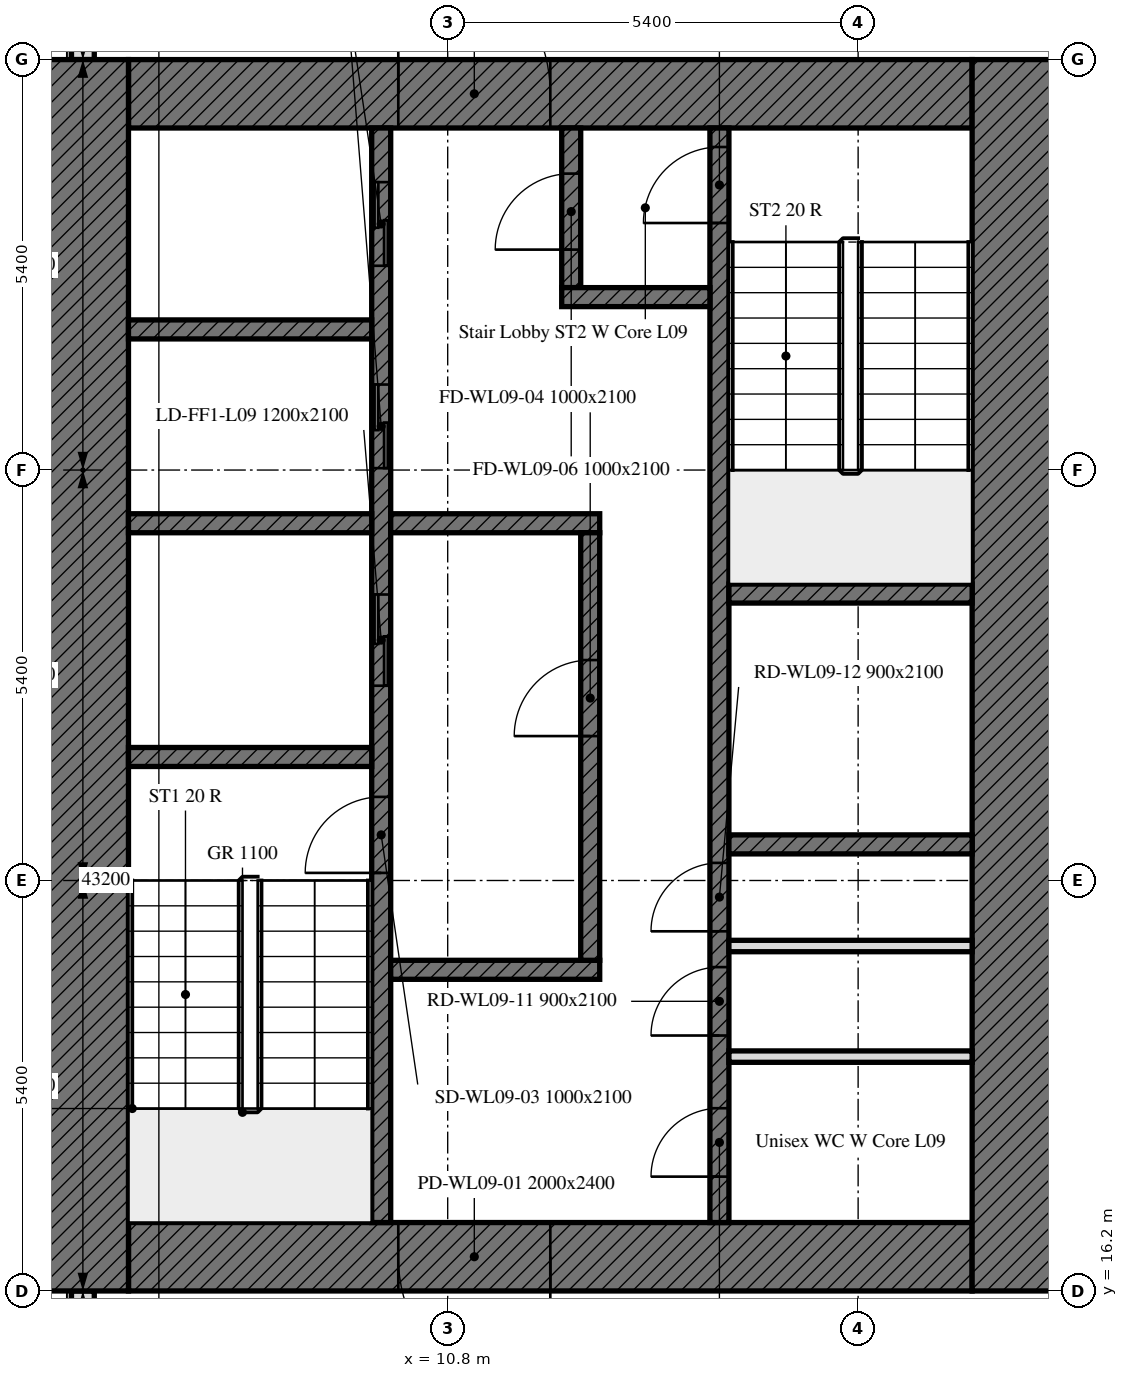
"""IFC4 building model, lengths in metres.
Left out: names, types, materials, properties, quantities, classifications, styles, units other than length and angle.
Written with IfcOpenShell. Run it as: python <this file> out.ifc"""

import sys

from ifc_helpers import new_model, si_unit, direction, frame, frame_2d, origin, place, context, subcontext, project, spatial, rectangle, extrude, element, fill, save


model = new_model("IFC4")
c1 = context("Model", 3, precision=1e-05, world=origin(), true_north=direction((0.0, 1.0)))
c2 = subcontext(c1, "Body", "Model", "MODEL_VIEW")
j1 = project(units=[si_unit("LENGTHUNIT", "METRE"), si_unit("PLANEANGLEUNIT", "RADIAN")], contexts=[c1])
p1 = place(None, origin())
s1 = spatial("IfcSite", under=j1, at=p1, CompositionType="ELEMENT")
p2 = place(p1, origin())
s2 = spatial("IfcBuilding", under=s1, at=p2, CompositionType="ELEMENT")
p3 = place(p2, frame((0.0, 0.0, 45.0)))
s3 = spatial("IfcBuildingStorey", under=s2, at=p3, CompositionType="ELEMENT", Elevation=45.0)
p4 = place(p3, frame((6.0, 37.614, 0.0), z_axis=(0.0, 0.0, 1.0), x_axis=(0.0, -1.0, 0.0)))
e1 = element("IfcWall", 1, at=p4, inside=s3, PredefinedType="SOLIDWALL", context=c2, shape_type="SweptSolid", body=[
    extrude(rectangle(XDim=5.214, YDim=0.3, at=frame_2d((2.607, 0.0))), origin(), (0.0, 0.0, 1.0), 3.5),
])
p5 = place(p3, frame((6.0, 16.2, 0.0), z_axis=(0.0, 0.0, 1.0), x_axis=(0.0, -1.0, 0.0)))
e2 = element("IfcWall", 2, at=p5, inside=s3, PredefinedType="SOLIDWALL", context=c2, shape_type="SweptSolid", body=[
    extrude(rectangle(XDim=10.614, YDim=0.3, at=frame_2d((5.307, 0.0))), origin(), (0.0, 0.0, 1.0), 3.5),
])
p6 = place(p5, frame((6.4, 0.0, 0.9)))
e3 = element("IfcOpeningElement", 3, at=p6, cuts=e2, PredefinedType="OPENING", context=c2, shape_type="SweptSolid", body=[
    extrude(rectangle(XDim=3.4, YDim=1.7, at=frame_2d((1.7, 0.85))), frame((0.0, 0.16, 0.0), z_axis=(0.0, -1.0, 0.0), x_axis=(1.0, 0.0, 0.0)), (0.0, 0.0, 1.0), 0.32),
])
p7 = place(p3, frame((17.7, 16.65, 0.0), z_axis=(0.0, 0.0, 1.0), x_axis=(-1.0, 0.0, 0.0)))
e4 = element("IfcWall", 4, at=p7, inside=s3, PredefinedType="SOLIDWALL", context=c2, shape_type="SweptSolid", body=[
    extrude(rectangle(XDim=11.1, YDim=0.9, at=frame_2d((5.55, 0.0))), origin(), (0.0, 0.0, 1.0), 3.5),
])
p8 = place(p7, frame((5.55, 0.0, 0.0)))
e5 = element("IfcOpeningElement", 5, at=p8, cuts=e4, PredefinedType="OPENING", context=c2, shape_type="SweptSolid", body=[
    extrude(rectangle(XDim=2.0, YDim=2.4, at=frame_2d((1.0, 1.2))), frame((0.0, 0.45, 0.0), z_axis=(0.0, -1.0, 0.0), x_axis=(1.0, 0.0, 0.0)), (0.0, 0.0, 1.0), 0.9),
])
p9 = place(p3, frame((6.6, 31.95, 0.0), z_axis=(0.0, 0.0, 1.0), x_axis=(1.0, 0.0, 0.0)))
e6 = element("IfcWall", 6, at=p9, inside=s3, PredefinedType="SOLIDWALL", context=c2, shape_type="SweptSolid", body=[
    extrude(rectangle(XDim=11.1, YDim=0.9, at=frame_2d((5.55, 0.0))), origin(), (0.0, 0.0, 1.0), 3.5),
])
p10 = place(p9, frame((3.55, 0.0, 0.0)))
e7 = element("IfcOpeningElement", 7, at=p10, cuts=e6, PredefinedType="OPENING", context=c2, shape_type="SweptSolid", body=[
    extrude(rectangle(XDim=2.0, YDim=2.4, at=frame_2d((1.0, 1.2))), frame((0.0, 0.45, 0.0), z_axis=(0.0, -1.0, 0.0), x_axis=(1.0, 0.0, 0.0)), (0.0, 0.0, 1.0), 0.9),
])
for number, where, z_axis, x_axis in (
    (8, (6.0, 16.2, 0.0), (0.0, 0.0, 1.0), (0.0, 1.0, 0.0)),
    (9, (18.3, 32.4, 0.0), (0.0, 0.0, 1.0), (0.0, -1.0, 0.0)),
):
    element("IfcWall", number, at=place(p3, frame(where, z_axis=z_axis, x_axis=x_axis)), inside=s3, PredefinedType="SOLIDWALL", context=c2, shape_type="SweptSolid", body=[
        extrude(rectangle(XDim=16.2, YDim=1.2, at=frame_2d((8.1, 0.0))), origin(), (0.0, 0.0, 1.0), 3.5),
    ])
p11 = place(p3, frame((9.925, 17.1, 0.0), z_axis=(0.0, 0.0, 1.0), x_axis=(0.0, 1.0, 0.0)))
e10 = element("IfcWall", 10, at=p11, inside=s3, PredefinedType="SOLIDWALL", context=c2, shape_type="SweptSolid", body=[
    extrude(rectangle(XDim=14.4, YDim=0.25, at=frame_2d((7.2, 0.0))), origin(), (0.0, 0.0, 1.0), 3.5),
])
p12 = place(p11, frame((4.6, 0.0, 0.0)))
e11 = element("IfcOpeningElement", 11, at=p12, cuts=e10, PredefinedType="OPENING", context=c2, shape_type="SweptSolid", body=[
    extrude(rectangle(XDim=1.0, YDim=2.1, at=frame_2d((0.5, 1.05))), frame((0.0, 0.125, 0.0), z_axis=(0.0, -1.0, 0.0), x_axis=(1.0, 0.0, 0.0)), (0.0, 0.0, 1.0), 0.25),
])
p13 = place(p11, frame((7.062, 0.0, 0.0)))
e12 = element("IfcOpeningElement", 12, at=p13, cuts=e10, PredefinedType="OPENING", context=c2, shape_type="SweptSolid", body=[
    extrude(rectangle(XDim=1.2, YDim=2.1, at=frame_2d((0.6, 1.05))), frame((0.0, 0.125, 0.0), z_axis=(0.0, -1.0, 0.0), x_axis=(1.0, 0.0, 0.0)), (0.0, 0.0, 1.0), 0.25),
])
p14 = place(p11, frame((9.925, 0.0, 0.0)))
e13 = element("IfcOpeningElement", 13, at=p14, cuts=e10, PredefinedType="OPENING", context=c2, shape_type="SweptSolid", body=[
    extrude(rectangle(XDim=1.1, YDim=2.1, at=frame_2d((0.55, 1.05))), frame((0.0, 0.125, 0.0), z_axis=(0.0, -1.0, 0.0), x_axis=(1.0, 0.0, 0.0)), (0.0, 0.0, 1.0), 0.25),
])
p15 = place(p11, frame((12.587, 0.0, 0.0)))
e14 = element("IfcOpeningElement", 14, at=p15, cuts=e10, PredefinedType="OPENING", context=c2, shape_type="SweptSolid", body=[
    extrude(rectangle(XDim=1.1, YDim=2.1, at=frame_2d((0.55, 1.05))), frame((0.0, 0.125, 0.0), z_axis=(0.0, -1.0, 0.0), x_axis=(1.0, 0.0, 0.0)), (0.0, 0.0, 1.0), 0.25),
])
p16 = place(p3, frame((14.375, 17.1, 0.0), z_axis=(0.0, 0.0, 1.0), x_axis=(0.0, 1.0, 0.0)))
e15 = element("IfcWall", 15, at=p16, inside=s3, PredefinedType="SOLIDWALL", context=c2, shape_type="SweptSolid", body=[
    extrude(rectangle(XDim=14.4, YDim=0.25, at=frame_2d((7.2, 0.0))), origin(), (0.0, 0.0, 1.0), 3.5),
])
p17 = place(p16, frame((13.15, 0.0, 0.0)))
e16 = element("IfcOpeningElement", 16, at=p17, cuts=e15, PredefinedType="OPENING", context=c2, shape_type="SweptSolid", body=[
    extrude(rectangle(XDim=1.0, YDim=2.1, at=frame_2d((0.5, 1.05))), frame((0.0, 0.125, 0.0), z_axis=(0.0, -1.0, 0.0), x_axis=(1.0, 0.0, 0.0)), (0.0, 0.0, 1.0), 0.25),
])
p18 = place(p16, frame((0.604, 0.0, 0.0)))
e17 = element("IfcOpeningElement", 17, at=p18, cuts=e15, PredefinedType="OPENING", context=c2, shape_type="SweptSolid", body=[
    extrude(rectangle(XDim=0.9, YDim=2.1, at=frame_2d((0.45, 1.05))), frame((0.0, 0.125, 0.0), z_axis=(0.0, -1.0, 0.0), x_axis=(1.0, 0.0, 0.0)), (0.0, 0.0, 1.0), 0.25),
])
p19 = place(p16, frame((2.46, 0.0, 0.0)))
e18 = element("IfcOpeningElement", 18, at=p19, cuts=e15, PredefinedType="OPENING", context=c2, shape_type="SweptSolid", body=[
    extrude(rectangle(XDim=0.9, YDim=2.1, at=frame_2d((0.45, 1.05))), frame((0.0, 0.125, 0.0), z_axis=(0.0, -1.0, 0.0), x_axis=(1.0, 0.0, 0.0)), (0.0, 0.0, 1.0), 0.25),
])
p20 = place(p16, frame((3.832, 0.0, 0.0)))
e19 = element("IfcOpeningElement", 19, at=p20, cuts=e15, PredefinedType="OPENING", context=c2, shape_type="SweptSolid", body=[
    extrude(rectangle(XDim=0.9, YDim=2.1, at=frame_2d((0.45, 1.05))), frame((0.0, 0.125, 0.0), z_axis=(0.0, -1.0, 0.0), x_axis=(1.0, 0.0, 0.0)), (0.0, 0.0, 1.0), 0.25),
])
for number, where, z_axis, x_axis in (
    (20, (6.6, 23.225, 0.0), (0.0, 0.0, 1.0), (1.0, 0.0, 0.0)),
    (21, (14.5, 25.375, 0.0), (0.0, 0.0, 1.0), (1.0, 0.0, 0.0)),
    (22, (14.5, 22.075, 0.0), (0.0, 0.0, 1.0), (1.0, 0.0, 0.0)),
    (23, (6.6, 26.3, 0.0), (0.0, 0.0, 1.0), (1.0, 0.0, 0.0)),
):
    element("IfcWall", number, at=place(p3, frame(where, z_axis=z_axis, x_axis=x_axis)), inside=s3, PredefinedType="SOLIDWALL", context=c2, shape_type="SweptSolid", body=[
        extrude(rectangle(XDim=3.2, YDim=0.25, at=frame_2d((1.6, 0.0))), origin(), (0.0, 0.0, 1.0), 3.5),
    ])
for number, where, z_axis, x_axis in (
    (24, (10.05, 26.3, 0.0), (0.0, 0.0, 1.0), (1.0, 0.0, 0.0)),
    (25, (10.05, 20.425, 0.0), (0.0, 0.0, 1.0), (1.0, 0.0, 0.0)),
):
    element("IfcWall", number, at=place(p3, frame(where, z_axis=z_axis, x_axis=x_axis)), inside=s3, PredefinedType="SOLIDWALL", context=c2, shape_type="SweptSolid", body=[
        extrude(rectangle(XDim=2.75, YDim=0.25, at=frame_2d((1.375, 0.0))), origin(), (0.0, 0.0, 1.0), 3.5),
    ])
p21 = place(p3, frame((12.425, 29.4, 0.0), z_axis=(0.0, 0.0, 1.0), x_axis=(0.0, 1.0, 0.0)))
e26 = element("IfcWall", 26, at=p21, inside=s3, PredefinedType="SOLIDWALL", context=c2, shape_type="SweptSolid", body=[
    extrude(rectangle(XDim=2.1, YDim=0.25, at=frame_2d((1.05, 0.0))), origin(), (0.0, 0.0, 1.0), 3.5),
])
p22 = place(p21, frame((0.5, 0.0, 0.0)))
e27 = element("IfcOpeningElement", 27, at=p22, cuts=e26, PredefinedType="OPENING", context=c2, shape_type="SweptSolid", body=[
    extrude(rectangle(XDim=1.0, YDim=2.1, at=frame_2d((0.5, 1.05))), frame((0.0, 0.125, 0.0), z_axis=(0.0, -1.0, 0.0), x_axis=(1.0, 0.0, 0.0)), (0.0, 0.0, 1.0), 0.25),
])
p23 = place(p3, frame((12.3, 29.275, 0.0), z_axis=(0.0, 0.0, 1.0), x_axis=(1.0, 0.0, 0.0)))
e28 = element("IfcWall", 28, at=p23, inside=s3, PredefinedType="SOLIDWALL", context=c2, shape_type="SweptSolid", body=[
    extrude(rectangle(XDim=1.95, YDim=0.25, at=frame_2d((0.975, 0.0))), origin(), (0.0, 0.0, 1.0), 3.5),
])
p24 = place(p3, frame((12.675, 20.55, 0.0), z_axis=(0.0, 0.0, 1.0), x_axis=(0.0, 1.0, 0.0)))
e29 = element("IfcWall", 29, at=p24, inside=s3, PredefinedType="SOLIDWALL", context=c2, shape_type="SweptSolid", body=[
    extrude(rectangle(XDim=5.625, YDim=0.25, at=frame_2d((2.812, 0.0))), origin(), (0.0, 0.0, 1.0), 3.5),
])
p25 = place(p24, frame((2.95, 0.0, 0.0)))
e30 = element("IfcOpeningElement", 30, at=p25, cuts=e29, PredefinedType="OPENING", context=c2, shape_type="SweptSolid", body=[
    extrude(rectangle(XDim=1.0, YDim=2.1, at=frame_2d((0.5, 1.05))), frame((0.0, 0.125, 0.0), z_axis=(0.0, -1.0, 0.0), x_axis=(1.0, 0.0, 0.0)), (0.0, 0.0, 1.0), 0.25),
])
p26 = place(p3, frame((6.6, 28.85, 0.0), z_axis=(0.0, 0.0, 1.0), x_axis=(1.0, 0.0, 0.0)))
e31 = element("IfcWall", 31, at=p26, inside=s3, PredefinedType="SOLIDWALL", context=c2, shape_type="SweptSolid", body=[
    extrude(rectangle(XDim=3.2, YDim=0.25, at=frame_2d((1.6, 0.0))), origin(), (0.0, 0.0, 1.0), 3.5),
])
for number, where, z_axis, x_axis in (
    (32, (14.5, 19.283, 0.0), (0.0, 0.0, 1.0), (1.0, 0.0, 0.0)),
    (33, (14.5, 20.738, 0.0), (0.0, 0.0, 1.0), (1.0, 0.0, 0.0)),
):
    element("IfcWall", number, at=place(p3, frame(where, z_axis=z_axis, x_axis=x_axis)), inside=s3, PredefinedType="PARTITIONING", context=c2, shape_type="SweptSolid", body=[
        extrude(rectangle(XDim=3.2, YDim=0.15, at=frame_2d((1.6, 0.0))), origin(), (0.0, 0.0, 1.0), 3.5),
    ])
p27 = place(p8, origin())
e34 = element("IfcDoor", 34, at=p27, inside=s3, OperationType="DOUBLE_DOOR_SINGLE_SWING", PredefinedType="DOOR", context=c2, shape_type="SweptSolid", body=[
    extrude(rectangle(XDim=2.0, YDim=2.4, at=frame_2d((1.0, 1.2))), frame((0.0, 0.025, 0.0), z_axis=(0.0, -1.0, 0.0), x_axis=(1.0, 0.0, 0.0)), (0.0, 0.0, 1.0), 0.05),
])
fill(e5, e34)
p28 = place(p10, origin())
e35 = element("IfcDoor", 35, at=p28, inside=s3, OperationType="DOUBLE_DOOR_SINGLE_SWING", PredefinedType="DOOR", context=c2, shape_type="SweptSolid", body=[
    extrude(rectangle(XDim=2.0, YDim=2.4, at=frame_2d((1.0, 1.2))), frame((0.0, 0.025, 0.0), z_axis=(0.0, -1.0, 0.0), x_axis=(1.0, 0.0, 0.0)), (0.0, 0.0, 1.0), 0.05),
])
fill(e7, e35)
p29 = place(p12, origin())
e36 = element("IfcDoor", 36, at=p29, inside=s3, OperationType="SINGLE_SWING_LEFT", PredefinedType="DOOR", context=c2, shape_type="SweptSolid", body=[
    extrude(rectangle(XDim=1.0, YDim=2.1, at=frame_2d((0.5, 1.05))), frame((0.0, 0.025, 0.0), z_axis=(0.0, -1.0, 0.0), x_axis=(1.0, 0.0, 0.0)), (0.0, 0.0, 1.0), 0.05),
])
fill(e11, e36)
p30 = place(p25, origin())
e37 = element("IfcDoor", 37, at=p30, inside=s3, OperationType="SINGLE_SWING_LEFT", PredefinedType="DOOR", context=c2, shape_type="SweptSolid", body=[
    extrude(rectangle(XDim=1.0, YDim=2.1, at=frame_2d((0.5, 1.05))), frame((0.0, 0.025, 0.0), z_axis=(0.0, -1.0, 0.0), x_axis=(1.0, 0.0, 0.0)), (0.0, 0.0, 1.0), 0.05),
])
fill(e30, e37)
p31 = place(p17, origin())
e38 = element("IfcDoor", 38, at=p31, inside=s3, OperationType="SINGLE_SWING_LEFT", PredefinedType="DOOR", context=c2, shape_type="SweptSolid", body=[
    extrude(rectangle(XDim=1.0, YDim=2.1, at=frame_2d((0.5, 1.05))), frame((0.0, 0.025, 0.0), z_axis=(0.0, -1.0, 0.0), x_axis=(1.0, 0.0, 0.0)), (0.0, 0.0, 1.0), 0.05),
])
fill(e16, e38)
p32 = place(p22, origin())
e39 = element("IfcDoor", 39, at=p32, inside=s3, OperationType="SINGLE_SWING_LEFT", PredefinedType="DOOR", context=c2, shape_type="SweptSolid", body=[
    extrude(rectangle(XDim=1.0, YDim=2.1, at=frame_2d((0.5, 1.05))), frame((0.0, 0.025, 0.0), z_axis=(0.0, -1.0, 0.0), x_axis=(1.0, 0.0, 0.0)), (0.0, 0.0, 1.0), 0.05),
])
fill(e27, e39)
p33 = place(p13, origin())
e40 = element("IfcDoor", 40, at=p33, inside=s3, OperationType="DOUBLE_DOOR_SLIDING", PredefinedType="DOOR", context=c2, shape_type="SweptSolid", body=[
    extrude(rectangle(XDim=1.2, YDim=2.1, at=frame_2d((0.6, 1.05))), frame((0.0, 0.025, 0.0), z_axis=(0.0, -1.0, 0.0), x_axis=(1.0, 0.0, 0.0)), (0.0, 0.0, 1.0), 0.05),
])
fill(e12, e40)
p34 = place(p14, origin())
e41 = element("IfcDoor", 41, at=p34, inside=s3, OperationType="DOUBLE_DOOR_SLIDING", PredefinedType="DOOR", context=c2, shape_type="SweptSolid", body=[
    extrude(rectangle(XDim=1.1, YDim=2.1, at=frame_2d((0.55, 1.05))), frame((0.0, 0.025, 0.0), z_axis=(0.0, -1.0, 0.0), x_axis=(1.0, 0.0, 0.0)), (0.0, 0.0, 1.0), 0.05),
])
fill(e13, e41)
p35 = place(p15, origin())
e42 = element("IfcDoor", 42, at=p35, inside=s3, OperationType="DOUBLE_DOOR_SLIDING", PredefinedType="DOOR", context=c2, shape_type="SweptSolid", body=[
    extrude(rectangle(XDim=1.1, YDim=2.1, at=frame_2d((0.55, 1.05))), frame((0.0, 0.025, 0.0), z_axis=(0.0, -1.0, 0.0), x_axis=(1.0, 0.0, 0.0)), (0.0, 0.0, 1.0), 0.05),
])
fill(e14, e42)
p36 = place(p18, origin())
e43 = element("IfcDoor", 43, at=p36, inside=s3, OperationType="SINGLE_SWING_LEFT", PredefinedType="DOOR", context=c2, shape_type="SweptSolid", body=[
    extrude(rectangle(XDim=0.9, YDim=2.1, at=frame_2d((0.45, 1.05))), frame((0.0, 0.025, 0.0), z_axis=(0.0, -1.0, 0.0), x_axis=(1.0, 0.0, 0.0)), (0.0, 0.0, 1.0), 0.05),
])
fill(e17, e43)
p37 = place(p19, origin())
e44 = element("IfcDoor", 44, at=p37, inside=s3, OperationType="SINGLE_SWING_LEFT", PredefinedType="DOOR", context=c2, shape_type="SweptSolid", body=[
    extrude(rectangle(XDim=0.9, YDim=2.1, at=frame_2d((0.45, 1.05))), frame((0.0, 0.025, 0.0), z_axis=(0.0, -1.0, 0.0), x_axis=(1.0, 0.0, 0.0)), (0.0, 0.0, 1.0), 0.05),
])
fill(e18, e44)
p38 = place(p20, origin())
e45 = element("IfcDoor", 45, at=p38, inside=s3, OperationType="SINGLE_SWING_LEFT", PredefinedType="DOOR", context=c2, shape_type="SweptSolid", body=[
    extrude(rectangle(XDim=0.9, YDim=2.1, at=frame_2d((0.45, 1.05))), frame((0.0, 0.025, 0.0), z_axis=(0.0, -1.0, 0.0), x_axis=(1.0, 0.0, 0.0)), (0.0, 0.0, 1.0), 0.05),
])
fill(e19, e45)
save(model, sys.argv[1])
